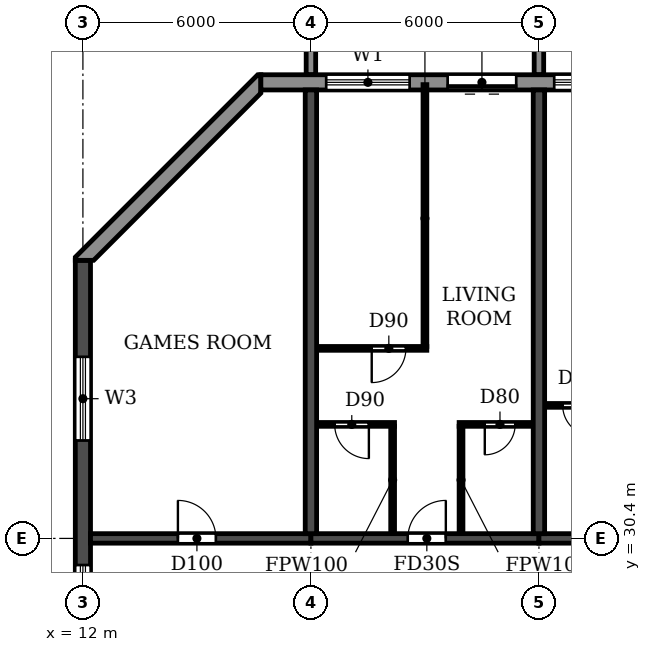
"""IFC4 building model, lengths in metres.
Left out: names, types, materials, properties, quantities, classifications, styles, units other than length and angle.
Written with IfcOpenShell. Run it as: python <this file> out.ifc"""

import sys

from ifc_helpers import new_model, si_unit, direction, frame, frame_2d, origin, place, context, subcontext, project, spatial, polyline, rectangle, outline, extrude, source, transform, mapped, element, fill, save


model = new_model("IFC4")
c1 = context("Model", 3, precision=1e-05, world=origin(), true_north=direction((0.0, 1.0)))
c2 = subcontext(c1, "Body", "Model", "MODEL_VIEW")
j1 = project(units=[si_unit("LENGTHUNIT", "METRE"), si_unit("PLANEANGLEUNIT", "RADIAN")], contexts=[c1])
p1 = place(None, origin())
s1 = spatial("IfcSite", under=j1, at=p1, CompositionType="ELEMENT")
p2 = place(p1, origin())
s2 = spatial("IfcBuilding", under=s1, at=p2, CompositionType="ELEMENT")
p3 = place(p2, frame((0.0, 0.0, 142.2)))
s3 = spatial("IfcBuildingStorey", under=s2, at=p3, CompositionType="ELEMENT", Elevation=142.2)
for number, where, z_axis, x_axis in (
    (1, (18.0, 30.525, 0.0), (0.0, 0.0, 1.0), (0.0, 1.0, 0.0)),
    (2, (24.0, 30.525, 0.0), (0.0, 0.0, 1.0), (0.0, 1.0, 0.0)),
):
    element("IfcWall", number, at=place(p3, frame(where, z_axis=z_axis, x_axis=x_axis)), inside=s3, PredefinedType="SHEAR", context=c2, shape_type="SweptSolid", body=[
        extrude(rectangle(XDim=11.675, YDim=0.3, at=frame_2d((5.837, 0.0))), origin(), (0.0, 0.0, 1.0), 3.07),
    ])
p4 = place(p3, frame((12.0, 4.683, 0.0), z_axis=(0.0, 0.0, 1.0), x_axis=(0.0, 1.0, 0.0)))
e3 = element("IfcWall", 3, at=p4, inside=s3, PredefinedType="SHEAR", context=c2, shape_type="SweptSolid", body=[
    extrude(rectangle(XDim=33.034, YDim=0.4, at=frame_2d((16.517, 0.0))), origin(), (0.0, 0.0, 1.0), 3.07),
])
p5 = place(p4, frame((23.817, 0.0, 0.9)))
e4 = element("IfcOpeningElement", 4, at=p5, cuts=e3, PredefinedType="OPENING", context=c2, shape_type="SweptSolid", body=[
    extrude(rectangle(XDim=1.2, YDim=1.5, at=frame_2d((0.6, 0.75))), frame((0.0, 0.21, 0.0), z_axis=(0.0, -1.0, 0.0), x_axis=(1.0, 0.0, 0.0)), (0.0, 0.0, 1.0), 0.42),
])
p6 = place(p4, frame((8.017, 0.0, 0.9)))
e5 = element("IfcOpeningElement", 5, at=p6, cuts=e3, PredefinedType="OPENING", context=c2, shape_type="SweptSolid", body=[
    extrude(rectangle(XDim=1.2, YDim=1.5, at=frame_2d((0.6, 0.75))), frame((0.0, 0.21, 0.0), z_axis=(0.0, -1.0, 0.0), x_axis=(1.0, 0.0, 0.0)), (0.0, 0.0, 1.0), 0.42),
])
p7 = place(p4, frame((28.293, 0.0, 0.6)))
e6 = element("IfcOpeningElement", 6, at=p7, cuts=e3, PredefinedType="OPENING", context=c2, shape_type="SweptSolid", body=[
    extrude(rectangle(XDim=2.2, YDim=1.8, at=frame_2d((1.1, 0.9))), frame((0.0, 0.21, 0.0), z_axis=(0.0, -1.0, 0.0), x_axis=(1.0, 0.0, 0.0)), (0.0, 0.0, 1.0), 0.42),
])
p8 = place(p4, frame((2.541, 0.0, 0.6)))
e7 = element("IfcOpeningElement", 7, at=p8, cuts=e3, PredefinedType="OPENING", context=c2, shape_type="SweptSolid", body=[
    extrude(rectangle(XDim=2.2, YDim=1.8, at=frame_2d((1.1, 0.9))), frame((0.0, 0.21, 0.0), z_axis=(0.0, -1.0, 0.0), x_axis=(1.0, 0.0, 0.0)), (0.0, 0.0, 1.0), 0.42),
])
p9 = place(p3, frame((12.2, 30.4, 0.0), z_axis=(0.0, 0.0, 1.0), x_axis=(1.0, 0.0, 0.0)))
e8 = element("IfcWall", 8, at=p9, inside=s3, PredefinedType="SHEAR", context=c2, shape_type="SweptSolid", body=[
    extrude(rectangle(XDim=5.8, YDim=0.25, at=frame_2d((2.9, 0.0))), origin(), (0.0, 0.0, 1.0), 2.47),
])
p10 = place(p9, frame((2.3, 0.0, 0.0)))
e9 = element("IfcOpeningElement", 9, at=p10, cuts=e8, PredefinedType="OPENING", context=c2, shape_type="SweptSolid", body=[
    extrude(rectangle(XDim=1.0, YDim=2.1, at=frame_2d((0.5, 1.05))), frame((0.0, 0.135, 0.0), z_axis=(0.0, -1.0, 0.0), x_axis=(1.0, 0.0, 0.0)), (0.0, 0.0, 1.0), 0.27),
])
p11 = place(p3, frame((18.0, 30.4, 0.0), z_axis=(0.0, 0.0, 1.0), x_axis=(1.0, 0.0, 0.0)))
e10 = element("IfcWall", 10, at=p11, inside=s3, PredefinedType="SHEAR", context=c2, shape_type="SweptSolid", body=[
    extrude(rectangle(XDim=6.0, YDim=0.25, at=frame_2d((3.0, 0.0))), origin(), (0.0, 0.0, 1.0), 2.47),
])
p12 = place(p11, frame((2.55, 0.0, 0.0)))
e11 = element("IfcOpeningElement", 11, at=p12, cuts=e10, PredefinedType="OPENING", context=c2, shape_type="SweptSolid", body=[
    extrude(rectangle(XDim=1.0, YDim=2.1, at=frame_2d((0.5, 1.05))), frame((0.0, 0.135, 0.0), z_axis=(0.0, -1.0, 0.0), x_axis=(1.0, 0.0, 0.0)), (0.0, 0.0, 1.0), 0.27),
])
p13 = place(p3, frame((24.0, 30.4, 0.0), z_axis=(0.0, 0.0, 1.0), x_axis=(1.0, 0.0, 0.0)))
e12 = element("IfcWall", 12, at=p13, inside=s3, PredefinedType="SHEAR", context=c2, shape_type="SweptSolid", body=[
    extrude(rectangle(XDim=6.0, YDim=0.25, at=frame_2d((3.0, 0.0))), origin(), (0.0, 0.0, 1.0), 2.47),
])
p14 = place(p13, frame((2.45, 0.0, 0.0)))
e13 = element("IfcOpeningElement", 13, at=p14, cuts=e12, PredefinedType="OPENING", context=c2, shape_type="SweptSolid", body=[
    extrude(rectangle(XDim=1.0, YDim=2.1, at=frame_2d((0.5, 1.05))), frame((0.0, 0.135, 0.0), z_axis=(0.0, -1.0, 0.0), x_axis=(1.0, 0.0, 0.0)), (0.0, 0.0, 1.0), 0.27),
])
p15 = place(p3, frame((85.317, 42.4, 0.0), z_axis=(0.0, 0.0, 1.0), x_axis=(-1.0, 0.0, 0.0)))
e14 = element("IfcWall", 14, at=p15, inside=s3, PredefinedType="STANDARD", context=c2, shape_type="SweptSolid", body=[
    extrude(rectangle(XDim=68.634, YDim=0.4, at=frame_2d((34.317, 0.0))), origin(), (0.0, 0.0, 1.0), 3.07),
])
p16 = place(p15, frame((64.717, 0.0, 0.9)))
e15 = element("IfcOpeningElement", 15, at=p16, cuts=e14, PredefinedType="OPENING", context=c2, shape_type="SweptSolid", body=[
    extrude(rectangle(XDim=2.2, YDim=1.5, at=frame_2d((1.1, 0.75))), frame((0.0, 0.21, 0.0), z_axis=(0.0, -1.0, 0.0), x_axis=(1.0, 0.0, 0.0)), (0.0, 0.0, 1.0), 0.42),
])
p17 = place(p15, frame((61.917, 0.0, 0.0)))
e16 = element("IfcOpeningElement", 16, at=p17, cuts=e14, PredefinedType="OPENING", context=c2, shape_type="SweptSolid", body=[
    extrude(rectangle(XDim=1.8, YDim=2.4, at=frame_2d((0.9, 1.2))), frame((0.0, 0.21, 0.0), z_axis=(0.0, -1.0, 0.0), x_axis=(1.0, 0.0, 0.0)), (0.0, 0.0, 1.0), 0.42),
])
p18 = place(p15, frame((58.717, 0.0, 0.9)))
e17 = element("IfcOpeningElement", 17, at=p18, cuts=e14, PredefinedType="OPENING", context=c2, shape_type="SweptSolid", body=[
    extrude(rectangle(XDim=2.2, YDim=1.5, at=frame_2d((1.1, 0.75))), frame((0.0, 0.21, 0.0), z_axis=(0.0, -1.0, 0.0), x_axis=(1.0, 0.0, 0.0)), (0.0, 0.0, 1.0), 0.42),
])
p19 = place(p15, frame((55.917, 0.0, 0.0)))
e18 = element("IfcOpeningElement", 18, at=p19, cuts=e14, PredefinedType="OPENING", context=c2, shape_type="SweptSolid", body=[
    extrude(rectangle(XDim=1.8, YDim=2.4, at=frame_2d((0.9, 1.2))), frame((0.0, 0.21, 0.0), z_axis=(0.0, -1.0, 0.0), x_axis=(1.0, 0.0, 0.0)), (0.0, 0.0, 1.0), 0.42),
])
p20 = place(p15, frame((52.717, 0.0, 0.9)))
e19 = element("IfcOpeningElement", 19, at=p20, cuts=e14, PredefinedType="OPENING", context=c2, shape_type="SweptSolid", body=[
    extrude(rectangle(XDim=2.2, YDim=1.5, at=frame_2d((1.1, 0.75))), frame((0.0, 0.21, 0.0), z_axis=(0.0, -1.0, 0.0), x_axis=(1.0, 0.0, 0.0)), (0.0, 0.0, 1.0), 0.42),
])
p21 = place(p15, frame((49.717, 0.0, 0.9)))
e20 = element("IfcOpeningElement", 20, at=p21, cuts=e14, PredefinedType="OPENING", context=c2, shape_type="SweptSolid", body=[
    extrude(rectangle(XDim=2.2, YDim=1.5, at=frame_2d((1.1, 0.75))), frame((0.0, 0.21, 0.0), z_axis=(0.0, -1.0, 0.0), x_axis=(1.0, 0.0, 0.0)), (0.0, 0.0, 1.0), 0.42),
])
p22 = place(p15, frame((46.917, 0.0, 0.0)))
e21 = element("IfcOpeningElement", 21, at=p22, cuts=e14, PredefinedType="OPENING", context=c2, shape_type="SweptSolid", body=[
    extrude(rectangle(XDim=1.8, YDim=2.4, at=frame_2d((0.9, 1.2))), frame((0.0, 0.21, 0.0), z_axis=(0.0, -1.0, 0.0), x_axis=(1.0, 0.0, 0.0)), (0.0, 0.0, 1.0), 0.42),
])
p23 = place(p15, frame((43.717, 0.0, 0.9)))
e22 = element("IfcOpeningElement", 22, at=p23, cuts=e14, PredefinedType="OPENING", context=c2, shape_type="SweptSolid", body=[
    extrude(rectangle(XDim=2.2, YDim=1.5, at=frame_2d((1.1, 0.75))), frame((0.0, 0.21, 0.0), z_axis=(0.0, -1.0, 0.0), x_axis=(1.0, 0.0, 0.0)), (0.0, 0.0, 1.0), 0.42),
])
p24 = place(p15, frame((40.717, 0.0, 0.9)))
e23 = element("IfcOpeningElement", 23, at=p24, cuts=e14, PredefinedType="OPENING", context=c2, shape_type="SweptSolid", body=[
    extrude(rectangle(XDim=2.2, YDim=1.5, at=frame_2d((1.1, 0.75))), frame((0.0, 0.21, 0.0), z_axis=(0.0, -1.0, 0.0), x_axis=(1.0, 0.0, 0.0)), (0.0, 0.0, 1.0), 0.42),
])
p25 = place(p15, frame((37.717, 0.0, 0.9)))
e24 = element("IfcOpeningElement", 24, at=p25, cuts=e14, PredefinedType="OPENING", context=c2, shape_type="SweptSolid", body=[
    extrude(rectangle(XDim=2.2, YDim=1.5, at=frame_2d((1.1, 0.75))), frame((0.0, 0.21, 0.0), z_axis=(0.0, -1.0, 0.0), x_axis=(1.0, 0.0, 0.0)), (0.0, 0.0, 1.0), 0.42),
])
p26 = place(p15, frame((34.717, 0.0, 0.9)))
e25 = element("IfcOpeningElement", 25, at=p26, cuts=e14, PredefinedType="OPENING", context=c2, shape_type="SweptSolid", body=[
    extrude(rectangle(XDim=2.2, YDim=1.5, at=frame_2d((1.1, 0.75))), frame((0.0, 0.21, 0.0), z_axis=(0.0, -1.0, 0.0), x_axis=(1.0, 0.0, 0.0)), (0.0, 0.0, 1.0), 0.42),
])
p27 = place(p15, frame((31.917, 0.0, 0.0)))
e26 = element("IfcOpeningElement", 26, at=p27, cuts=e14, PredefinedType="OPENING", context=c2, shape_type="SweptSolid", body=[
    extrude(rectangle(XDim=1.8, YDim=2.4, at=frame_2d((0.9, 1.2))), frame((0.0, 0.21, 0.0), z_axis=(0.0, -1.0, 0.0), x_axis=(1.0, 0.0, 0.0)), (0.0, 0.0, 1.0), 0.42),
])
p28 = place(p15, frame((28.917, 0.0, 0.0)))
e27 = element("IfcOpeningElement", 27, at=p28, cuts=e14, PredefinedType="OPENING", context=c2, shape_type="SweptSolid", body=[
    extrude(rectangle(XDim=1.8, YDim=2.4, at=frame_2d((0.9, 1.2))), frame((0.0, 0.21, 0.0), z_axis=(0.0, -1.0, 0.0), x_axis=(1.0, 0.0, 0.0)), (0.0, 0.0, 1.0), 0.42),
])
p29 = place(p15, frame((25.717, 0.0, 0.9)))
e28 = element("IfcOpeningElement", 28, at=p29, cuts=e14, PredefinedType="OPENING", context=c2, shape_type="SweptSolid", body=[
    extrude(rectangle(XDim=2.2, YDim=1.5, at=frame_2d((1.1, 0.75))), frame((0.0, 0.21, 0.0), z_axis=(0.0, -1.0, 0.0), x_axis=(1.0, 0.0, 0.0)), (0.0, 0.0, 1.0), 0.42),
])
p30 = place(p15, frame((22.717, 0.0, 0.9)))
e29 = element("IfcOpeningElement", 29, at=p30, cuts=e14, PredefinedType="OPENING", context=c2, shape_type="SweptSolid", body=[
    extrude(rectangle(XDim=2.2, YDim=1.5, at=frame_2d((1.1, 0.75))), frame((0.0, 0.21, 0.0), z_axis=(0.0, -1.0, 0.0), x_axis=(1.0, 0.0, 0.0)), (0.0, 0.0, 1.0), 0.42),
])
p31 = place(p15, frame((19.717, 0.0, 0.9)))
e30 = element("IfcOpeningElement", 30, at=p31, cuts=e14, PredefinedType="OPENING", context=c2, shape_type="SweptSolid", body=[
    extrude(rectangle(XDim=2.2, YDim=1.5, at=frame_2d((1.1, 0.75))), frame((0.0, 0.21, 0.0), z_axis=(0.0, -1.0, 0.0), x_axis=(1.0, 0.0, 0.0)), (0.0, 0.0, 1.0), 0.42),
])
p32 = place(p15, frame((16.717, 0.0, 0.9)))
e31 = element("IfcOpeningElement", 31, at=p32, cuts=e14, PredefinedType="OPENING", context=c2, shape_type="SweptSolid", body=[
    extrude(rectangle(XDim=2.2, YDim=1.5, at=frame_2d((1.1, 0.75))), frame((0.0, 0.21, 0.0), z_axis=(0.0, -1.0, 0.0), x_axis=(1.0, 0.0, 0.0)), (0.0, 0.0, 1.0), 0.42),
])
p33 = place(p15, frame((13.917, 0.0, 0.0)))
e32 = element("IfcOpeningElement", 32, at=p33, cuts=e14, PredefinedType="OPENING", context=c2, shape_type="SweptSolid", body=[
    extrude(rectangle(XDim=1.8, YDim=2.4, at=frame_2d((0.9, 1.2))), frame((0.0, 0.21, 0.0), z_axis=(0.0, -1.0, 0.0), x_axis=(1.0, 0.0, 0.0)), (0.0, 0.0, 1.0), 0.42),
])
p34 = place(p15, frame((10.917, 0.0, 0.0)))
e33 = element("IfcOpeningElement", 33, at=p34, cuts=e14, PredefinedType="OPENING", context=c2, shape_type="SweptSolid", body=[
    extrude(rectangle(XDim=1.8, YDim=2.4, at=frame_2d((0.9, 1.2))), frame((0.0, 0.21, 0.0), z_axis=(0.0, -1.0, 0.0), x_axis=(1.0, 0.0, 0.0)), (0.0, 0.0, 1.0), 0.42),
])
p35 = place(p15, frame((7.717, 0.0, 0.9)))
e34 = element("IfcOpeningElement", 34, at=p35, cuts=e14, PredefinedType="OPENING", context=c2, shape_type="SweptSolid", body=[
    extrude(rectangle(XDim=2.2, YDim=1.5, at=frame_2d((1.1, 0.75))), frame((0.0, 0.21, 0.0), z_axis=(0.0, -1.0, 0.0), x_axis=(1.0, 0.0, 0.0)), (0.0, 0.0, 1.0), 0.42),
])
p36 = place(p15, frame((4.717, 0.0, 0.9)))
e35 = element("IfcOpeningElement", 35, at=p36, cuts=e14, PredefinedType="OPENING", context=c2, shape_type="SweptSolid", body=[
    extrude(rectangle(XDim=2.2, YDim=1.5, at=frame_2d((1.1, 0.75))), frame((0.0, 0.21, 0.0), z_axis=(0.0, -1.0, 0.0), x_axis=(1.0, 0.0, 0.0)), (0.0, 0.0, 1.0), 0.42),
])
p37 = place(p15, frame((1.917, 0.0, 0.0)))
e36 = element("IfcOpeningElement", 36, at=p37, cuts=e14, PredefinedType="OPENING", context=c2, shape_type="SweptSolid", body=[
    extrude(rectangle(XDim=1.8, YDim=2.4, at=frame_2d((0.9, 1.2))), frame((0.0, 0.21, 0.0), z_axis=(0.0, -1.0, 0.0), x_axis=(1.0, 0.0, 0.0)), (0.0, 0.0, 1.0), 0.42),
])
p38 = place(p3, origin())
e37 = element("IfcWall", 37, at=p38, inside=s3, PredefinedType="STANDARD", context=c2, shape_type="SweptSolid", body=[
    extrude(outline(polyline([(16.683, 42.6), (16.6, 42.6), (11.8, 37.8), (11.8, 37.717), (12.283, 37.717), (16.683, 42.117), (16.683, 42.6)])), origin(), (0.0, 0.0, 1.0), 3.07),
])
m1 = source(origin(), c2, "Body", "SweptSolid", [
    extrude(outline(polyline([(0.0, 0.0), (0.25, 0.0), (0.25, 3.1), (0.0, 3.1), (0.0, 0.0)])), origin(), (0.0, 0.0, 1.0), 3.1),
])
for number, where in (
    (38, (17.875, 42.6, 0.0)),
    (39, (23.875, 42.6, 0.0)),
):
    element("IfcWall", number, at=place(p3, frame(where)), inside=s3, PredefinedType="STANDARD", context=c2, shape_type="MappedRepresentation", body=[
        mapped(m1, transform((0.0, 0.0, 0.0))),
    ])
p39 = place(p3, frame((18.16, 33.4, 0.0), z_axis=(0.0, 0.0, 1.0), x_axis=(1.0, 0.0, 0.0)))
e40 = element("IfcWall", 40, at=p39, inside=s3, PredefinedType="PARTITIONING", context=c2, shape_type="SweptSolid", body=[
    extrude(rectangle(XDim=2.04, YDim=0.1, at=frame_2d((1.02, 0.0))), origin(), (0.0, 0.0, 1.0), 3.07),
])
p40 = place(p39, frame((0.465, 0.0, 0.0)))
e41 = element("IfcOpeningElement", 41, at=p40, cuts=e40, PredefinedType="OPENING", context=c2, shape_type="SweptSolid", body=[
    extrude(rectangle(XDim=0.9, YDim=2.1, at=frame_2d((0.45, 1.05))), frame((0.0, 0.06, 0.0), z_axis=(0.0, -1.0, 0.0), x_axis=(1.0, 0.0, 0.0)), (0.0, 0.0, 1.0), 0.12),
])
p41 = place(p3, frame((21.9, 33.4, 0.0), z_axis=(0.0, 0.0, 1.0), x_axis=(1.0, 0.0, 0.0)))
e42 = element("IfcWall", 42, at=p41, inside=s3, PredefinedType="PARTITIONING", context=c2, shape_type="SweptSolid", body=[
    extrude(rectangle(XDim=1.94, YDim=0.1, at=frame_2d((0.97, 0.0))), origin(), (0.0, 0.0, 1.0), 3.07),
])
p42 = place(p41, frame((0.675, 0.0, 0.0)))
e43 = element("IfcOpeningElement", 43, at=p42, cuts=e42, PredefinedType="OPENING", context=c2, shape_type="SweptSolid", body=[
    extrude(rectangle(XDim=0.8, YDim=2.1, at=frame_2d((0.4, 1.05))), frame((0.0, 0.06, 0.0), z_axis=(0.0, -1.0, 0.0), x_axis=(1.0, 0.0, 0.0)), (0.0, 0.0, 1.0), 0.12),
])
p43 = place(p3, frame((24.16, 33.9, 0.0), z_axis=(0.0, 0.0, 1.0), x_axis=(1.0, 0.0, 0.0)))
e44 = element("IfcWall", 44, at=p43, inside=s3, PredefinedType="PARTITIONING", context=c2, shape_type="SweptSolid", body=[
    extrude(rectangle(XDim=1.94, YDim=0.1, at=frame_2d((0.97, 0.0))), origin(), (0.0, 0.0, 1.0), 3.07),
])
p44 = place(p43, frame((0.465, 0.0, 0.0)))
e45 = element("IfcOpeningElement", 45, at=p44, cuts=e44, PredefinedType="OPENING", context=c2, shape_type="SweptSolid", body=[
    extrude(rectangle(XDim=0.8, YDim=2.1, at=frame_2d((0.4, 1.05))), frame((0.0, 0.06, 0.0), z_axis=(0.0, -1.0, 0.0), x_axis=(1.0, 0.0, 0.0)), (0.0, 0.0, 1.0), 0.12),
])
p45 = place(p3, frame((18.16, 35.4, 0.0), z_axis=(0.0, 0.0, 1.0), x_axis=(1.0, 0.0, 0.0)))
e46 = element("IfcWall", 46, at=p45, inside=s3, PredefinedType="PARTITIONING", context=c2, shape_type="SweptSolid", body=[
    extrude(rectangle(XDim=2.89, YDim=0.1, at=frame_2d((1.445, 0.0))), origin(), (0.0, 0.0, 1.0), 3.07),
])
p46 = place(p45, frame((1.44, 0.0, 0.0)))
e47 = element("IfcOpeningElement", 47, at=p46, cuts=e46, PredefinedType="OPENING", context=c2, shape_type="SweptSolid", body=[
    extrude(rectangle(XDim=0.9, YDim=2.1, at=frame_2d((0.45, 1.05))), frame((0.0, 0.06, 0.0), z_axis=(0.0, -1.0, 0.0), x_axis=(1.0, 0.0, 0.0)), (0.0, 0.0, 1.0), 0.12),
])
p47 = place(p3, frame((20.15, 30.535, 0.0), z_axis=(0.0, 0.0, 1.0), x_axis=(0.0, 1.0, 0.0)))
e48 = element("IfcWall", 48, at=p47, inside=s3, PredefinedType="PARTITIONING", context=c2, shape_type="SweptSolid", body=[
    extrude(rectangle(XDim=2.815, YDim=0.1, at=frame_2d((1.408, 0.0))), origin(), (0.0, 0.0, 1.0), 3.07),
])
p48 = place(p3, frame((21.0, 35.45, 0.0), z_axis=(0.0, 0.0, 1.0), x_axis=(0.0, 1.0, 0.0)))
e49 = element("IfcWall", 49, at=p48, inside=s3, PredefinedType="PARTITIONING", context=c2, shape_type="SweptSolid", body=[
    extrude(rectangle(XDim=6.89, YDim=0.1, at=frame_2d((3.445, 0.0))), origin(), (0.0, 0.0, 1.0), 3.07),
])
p49 = place(p3, frame((21.95, 30.535, 0.0), z_axis=(0.0, 0.0, 1.0), x_axis=(0.0, 1.0, 0.0)))
e50 = element("IfcWall", 50, at=p49, inside=s3, PredefinedType="PARTITIONING", context=c2, shape_type="SweptSolid", body=[
    extrude(rectangle(XDim=2.815, YDim=0.1, at=frame_2d((1.408, 0.0))), origin(), (0.0, 0.0, 1.0), 3.07),
])
p50 = place(p16, origin())
e51 = element("IfcWindow", 51, at=p50, inside=s3, PartitioningType="DOUBLE_PANEL_HORIZONTAL", PredefinedType="WINDOW", context=c2, shape_type="SweptSolid", body=[
    extrude(rectangle(XDim=2.2, YDim=1.5, at=frame_2d((1.1, 0.75))), frame((0.0, 0.03, 0.0), z_axis=(0.0, -1.0, 0.0), x_axis=(1.0, 0.0, 0.0)), (0.0, 0.0, 1.0), 0.06),
])
fill(e15, e51)
p51 = place(p17, origin())
e52 = element("IfcDoor", 52, at=p51, inside=s3, OperationType="DOUBLE_DOOR_SLIDING", PredefinedType="DOOR", context=c2, shape_type="SweptSolid", body=[
    extrude(rectangle(XDim=1.8, YDim=2.4, at=frame_2d((0.9, 1.2))), frame((0.0, 0.025, 0.0), z_axis=(0.0, -1.0, 0.0), x_axis=(1.0, 0.0, 0.0)), (0.0, 0.0, 1.0), 0.05),
])
fill(e16, e52)
p52 = place(p18, origin())
e53 = element("IfcWindow", 53, at=p52, inside=s3, PartitioningType="DOUBLE_PANEL_HORIZONTAL", PredefinedType="WINDOW", context=c2, shape_type="SweptSolid", body=[
    extrude(rectangle(XDim=2.2, YDim=1.5, at=frame_2d((1.1, 0.75))), frame((0.0, 0.03, 0.0), z_axis=(0.0, -1.0, 0.0), x_axis=(1.0, 0.0, 0.0)), (0.0, 0.0, 1.0), 0.06),
])
fill(e17, e53)
p53 = place(p5, origin())
e54 = element("IfcWindow", 54, at=p53, inside=s3, PartitioningType="SINGLE_PANEL", PredefinedType="WINDOW", context=c2, shape_type="SweptSolid", body=[
    extrude(rectangle(XDim=1.2, YDim=1.5, at=frame_2d((0.6, 0.75))), frame((0.0, 0.03, 0.0), z_axis=(0.0, -1.0, 0.0), x_axis=(1.0, 0.0, 0.0)), (0.0, 0.0, 1.0), 0.06),
])
fill(e4, e54)
p54 = place(p7, origin())
e55 = element("IfcWindow", 55, at=p54, inside=s3, PartitioningType="DOUBLE_PANEL_HORIZONTAL", PredefinedType="WINDOW", context=c2, shape_type="SweptSolid", body=[
    extrude(rectangle(XDim=2.2, YDim=1.8, at=frame_2d((1.1, 0.9))), frame((0.0, 0.03, 0.0), z_axis=(0.0, -1.0, 0.0), x_axis=(1.0, 0.0, 0.0)), (0.0, 0.0, 1.0), 0.06),
])
fill(e6, e55)
p55 = place(p10, origin())
e56 = element("IfcDoor", 56, at=p55, inside=s3, OperationType="SINGLE_SWING_LEFT", PredefinedType="DOOR", context=c2, shape_type="SweptSolid", body=[
    extrude(rectangle(XDim=1.0, YDim=2.1, at=frame_2d((0.5, 1.05))), frame((0.0, 0.025, 0.0), z_axis=(0.0, -1.0, 0.0), x_axis=(1.0, 0.0, 0.0)), (0.0, 0.0, 1.0), 0.05),
])
fill(e9, e56)
p56 = place(p40, frame((0.9, 0.0, 0.0), z_axis=(0.0, 0.0, 1.0), x_axis=(-1.0, 0.0, 0.0)))
e57 = element("IfcDoor", 57, at=p56, inside=s3, OperationType="SINGLE_SWING_LEFT", PredefinedType="DOOR", context=c2, shape_type="SweptSolid", body=[
    extrude(rectangle(XDim=0.9, YDim=2.1, at=frame_2d((0.45, 1.05))), frame((0.0, 0.025, 0.0), z_axis=(0.0, -1.0, 0.0), x_axis=(1.0, 0.0, 0.0)), (0.0, 0.0, 1.0), 0.05),
])
fill(e41, e57)
p57 = place(p46, frame((0.9, 0.0, 0.0), z_axis=(0.0, 0.0, 1.0), x_axis=(-1.0, 0.0, 0.0)))
e58 = element("IfcDoor", 58, at=p57, inside=s3, OperationType="SINGLE_SWING_RIGHT", PredefinedType="DOOR", context=c2, shape_type="SweptSolid", body=[
    extrude(rectangle(XDim=0.9, YDim=2.1, at=frame_2d((0.45, 1.05))), frame((0.0, 0.025, 0.0), z_axis=(0.0, -1.0, 0.0), x_axis=(1.0, 0.0, 0.0)), (0.0, 0.0, 1.0), 0.05),
])
fill(e47, e58)
p58 = place(p12, origin())
e59 = element("IfcDoor", 59, at=p58, inside=s3, OperationType="SINGLE_SWING_RIGHT", PredefinedType="DOOR", context=c2, shape_type="SweptSolid", body=[
    extrude(rectangle(XDim=1.0, YDim=2.1, at=frame_2d((0.5, 1.05))), frame((0.0, 0.025, 0.0), z_axis=(0.0, -1.0, 0.0), x_axis=(1.0, 0.0, 0.0)), (0.0, 0.0, 1.0), 0.05),
])
fill(e11, e59)
p59 = place(p42, frame((0.8, 0.0, 0.0), z_axis=(0.0, 0.0, 1.0), x_axis=(-1.0, 0.0, 0.0)))
e60 = element("IfcDoor", 60, at=p59, inside=s3, OperationType="SINGLE_SWING_RIGHT", PredefinedType="DOOR", context=c2, shape_type="SweptSolid", body=[
    extrude(rectangle(XDim=0.8, YDim=2.1, at=frame_2d((0.4, 1.05))), frame((0.0, 0.025, 0.0), z_axis=(0.0, -1.0, 0.0), x_axis=(1.0, 0.0, 0.0)), (0.0, 0.0, 1.0), 0.05),
])
fill(e43, e60)
p60 = place(p44, frame((0.8, 0.0, 0.0), z_axis=(0.0, 0.0, 1.0), x_axis=(-1.0, 0.0, 0.0)))
e61 = element("IfcDoor", 61, at=p60, inside=s3, OperationType="SINGLE_SWING_LEFT", PredefinedType="DOOR", context=c2, shape_type="SweptSolid", body=[
    extrude(rectangle(XDim=0.8, YDim=2.1, at=frame_2d((0.4, 1.05))), frame((0.0, 0.025, 0.0), z_axis=(0.0, -1.0, 0.0), x_axis=(1.0, 0.0, 0.0)), (0.0, 0.0, 1.0), 0.05),
])
fill(e45, e61)
save(model, sys.argv[1])
